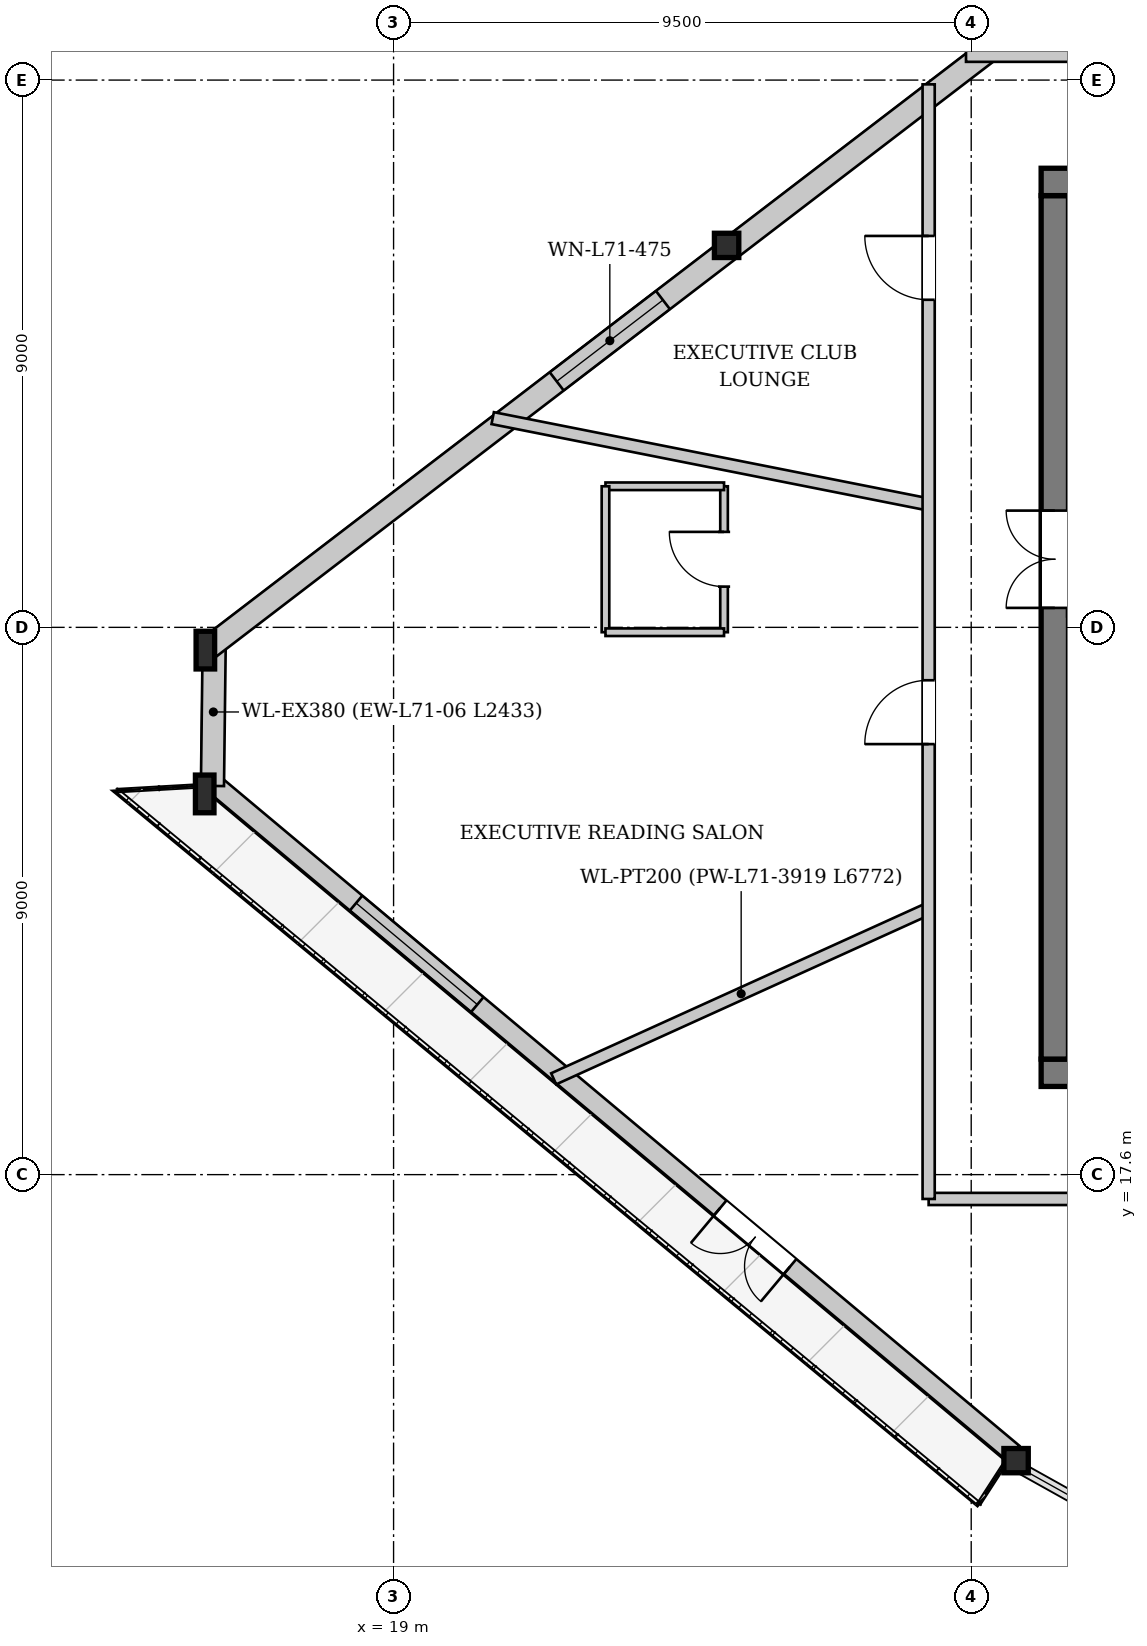
"""IFC4 building model, lengths in metres.
Left out: names, types, materials, properties, quantities, classifications, styles, units other than length and angle.
Written with IfcOpenShell. Run it as: python <this file> out.ifc"""

import sys

from ifc_helpers import new_model, si_unit, direction, frame, frame_2d, origin, origin_2d, place, context, subcontext, project, spatial, rectangle, i_section, extrude, source, transform, mapped, element, fill, save


model = new_model("IFC4")
c1 = context("Model", 3, precision=1e-05, world=origin(), true_north=direction((0.0, 1.0)))
c2 = subcontext(c1, "Body", "Model", "MODEL_VIEW")
j1 = project(units=[si_unit("LENGTHUNIT", "METRE"), si_unit("PLANEANGLEUNIT", "RADIAN")], contexts=[c1])
p1 = place(None, origin())
s1 = spatial("IfcSite", under=j1, at=p1, CompositionType="ELEMENT")
p2 = place(p1, origin())
s2 = spatial("IfcBuilding", under=s1, at=p2, CompositionType="ELEMENT")
p3 = place(p2, frame((0.0, 0.0, 266.9)))
s3 = spatial("IfcBuildingStorey", under=s2, at=p3, CompositionType="ELEMENT", Elevation=266.9)
m1 = source(origin(), c2, "Body", "SweptSolid", [
    extrude(i_section(OverallWidth=0.401, OverallDepth=0.399, WebThickness=0.022, FlangeThickness=0.034, at=origin_2d()), origin(), (0.0, 0.0, 1.0), 3.449),
])
p4 = place(p3, frame((24.491, 33.034, 0.0), z_axis=(-0.008211715647, -0.088700687123, 0.996024475518), x_axis=(0.995742024997, -0.092183619234, 0.0)))
e1 = element("IfcColumn", 1, at=p4, inside=s3, PredefinedType="COLUMN", context=c2, shape_type="MappedRepresentation", body=[
    mapped(m1, transform((0.0, 0.0, 0.0), x_axis=(1.0, 0.0, 0.0), y_axis=(0.0, 1.0, 0.0), z_axis=(0.0, 0.0, 1.0), scale=1.0)),
])
m2 = source(origin(), c2, "Body", "SweptSolid", [
    extrude(i_section(OverallWidth=0.305, OverallDepth=0.62, WebThickness=0.021, FlangeThickness=0.04, at=origin_2d()), origin(), (0.0, 0.0, 1.0), 3.46),
])
p5 = place(p3, frame((15.861, 26.427, 0.0), z_axis=(0.025262966256, -0.116435459002, 0.992876914035), x_axis=(0.977261812504, 0.212036199319, 0.0)))
e2 = element("IfcColumn", 2, at=p5, inside=s3, PredefinedType="COLUMN", context=c2, shape_type="MappedRepresentation", body=[
    mapped(m2, transform((0.0, 0.0, 0.0), x_axis=(1.0, 0.0, 0.0), y_axis=(0.0, 1.0, 0.0), z_axis=(0.0, 0.0, 1.0), scale=1.0)),
])
m3 = source(origin(), c2, "Body", "SweptSolid", [
    extrude(i_section(OverallWidth=0.305, OverallDepth=0.62, WebThickness=0.021, FlangeThickness=0.04, at=origin_2d()), origin(), (0.0, 0.0, 1.0), 3.448),
])
p6 = place(p3, frame((15.831, 23.994, 0.0), z_axis=(0.036256323358, -0.077398752793, 0.996340761026), x_axis=(0.90556835757, 0.42420036512, 0.0)))
e3 = element("IfcColumn", 3, at=p6, inside=s3, PredefinedType="COLUMN", context=c2, shape_type="MappedRepresentation", body=[
    mapped(m3, transform((0.0, 0.0, 0.0), x_axis=(1.0, 0.0, 0.0), y_axis=(0.0, 1.0, 0.0), z_axis=(0.0, 0.0, 1.0), scale=1.0)),
])
m4 = source(origin(), c2, "Body", "SweptSolid", [
    extrude(i_section(OverallWidth=0.401, OverallDepth=0.399, WebThickness=0.022, FlangeThickness=0.034, at=origin_2d()), origin(), (0.0, 0.0, 1.0), 3.448),
])
p7 = place(p3, frame((29.086, 12.897, 0.0), z_axis=(0.088141745555, -0.000212389748, 0.996107919646), x_axis=(0.002409631559, 0.999997096834, 0.0)))
e4 = element("IfcColumn", 4, at=p7, inside=s3, PredefinedType="COLUMN", context=c2, shape_type="MappedRepresentation", body=[
    mapped(m4, transform((0.0, 0.0, 0.0), x_axis=(1.0, 0.0, 0.0), y_axis=(0.0, 1.0, 0.0), z_axis=(0.0, 0.0, 1.0), scale=1.0)),
])
p8 = place(p3, frame((29.189, 13.02, 0.0), z_axis=(0.0, 0.0, 1.0), x_axis=(-0.76674910501, 0.641946890301, 0.0)))
e5 = element("IfcWall", 5, at=p8, inside=s3, PredefinedType="SOLIDWALL", context=c2, shape_type="SweptSolid", body=[
    extrude(rectangle(XDim=17.287, YDim=0.32, at=frame_2d((8.644, 0.0))), origin(), (0.0, 0.0, 1.0), 2.872),
])
p9 = place(p8, frame((4.782, 0.0, 0.0)))
e6 = element("IfcOpeningElement", 6, at=p9, cuts=e5, PredefinedType="OPENING", context=c2, shape_type="SweptSolid", body=[
    extrude(rectangle(XDim=1.5, YDim=2.3, at=frame_2d((0.75, 1.15))), frame((0.0, 0.17, 0.0), z_axis=(0.0, -1.0, 0.0), x_axis=(1.0, 0.0, 0.0)), (0.0, 0.0, 1.0), 0.34),
])
p10 = place(p8, frame((11.492, 0.0, 0.402)))
e7 = element("IfcOpeningElement", 7, at=p10, cuts=e5, PredefinedType="OPENING", context=c2, shape_type="SweptSolid", body=[
    extrude(rectangle(XDim=2.6, YDim=2.35, at=frame_2d((1.3, 1.175))), frame((0.0, 0.17, 0.0), z_axis=(0.0, -1.0, 0.0), x_axis=(1.0, 0.0, 0.0)), (0.0, 0.0, 1.0), 0.34),
])
p11 = place(p3, frame((16.021, 23.992, 0.0), z_axis=(0.0, 0.0, 1.0), x_axis=(0.012141603698, 0.999926288013, 0.0)))
e8 = element("IfcWall", 8, at=p11, inside=s3, PredefinedType="SOLIDWALL", context=c2, shape_type="SweptSolid", body=[
    extrude(rectangle(XDim=2.433, YDim=0.38, at=frame_2d((1.217, 0.0))), origin(), (0.0, 0.0, 1.0), 2.872),
])
p12 = place(p3, frame((15.976, 26.276, 0.0), z_axis=(0.0, 0.0, 1.0), x_axis=(0.794029694054, 0.607878972297, 0.0)))
e9 = element("IfcWall", 9, at=p12, inside=s3, PredefinedType="SOLIDWALL", context=c2, shape_type="SweptSolid", body=[
    extrude(rectangle(XDim=21.739, YDim=0.38, at=frame_2d((10.869, 0.0))), origin(), (0.0, 0.0, 1.0), 2.872),
])
p13 = place(p12, frame((7.187, 0.0, 0.502)))
e10 = element("IfcOpeningElement", 10, at=p13, cuts=e9, PredefinedType="OPENING", context=c2, shape_type="SweptSolid", body=[
    extrude(rectangle(XDim=2.2, YDim=2.25, at=frame_2d((1.1, 1.125))), frame((0.0, 0.2, 0.0), z_axis=(0.0, -1.0, 0.0), x_axis=(1.0, 0.0, 0.0)), (0.0, 0.0, 1.0), 0.4),
])
p14 = place(p12, frame((16.752, 0.0, 0.502)))
e11 = element("IfcOpeningElement", 11, at=p14, cuts=e9, PredefinedType="OPENING", context=c2, shape_type="SweptSolid", body=[
    extrude(rectangle(XDim=2.2, YDim=2.25, at=frame_2d((1.1, 1.125))), frame((0.0, 0.2, 0.0), z_axis=(0.0, -1.0, 0.0), x_axis=(1.0, 0.0, 0.0)), (0.0, 0.0, 1.0), 0.4),
])
p15 = place(p3, frame((46.35, 19.275, 0.0), z_axis=(0.0, 0.0, 1.0), x_axis=(-1.0, 0.0, 0.0)))
e12 = element("IfcWall", 12, at=p15, inside=s3, PredefinedType="SHEAR", context=c2, shape_type="SweptSolid", body=[
    extrude(rectangle(XDim=16.7, YDim=0.45, at=frame_2d((8.35, 0.0))), origin(), (0.0, 0.0, 1.0), 3.38),
])
p16 = place(p15, frame((4.55, 0.0, 0.0)))
e13 = element("IfcOpeningElement", 13, at=p16, cuts=e12, PredefinedType="OPENING", context=c2, shape_type="SweptSolid", body=[
    extrude(rectangle(XDim=1.12, YDim=2.25, at=frame_2d((0.56, 1.125))), frame((0.0, 0.235, 0.0), z_axis=(0.0, -1.0, 0.0), x_axis=(1.0, 0.0, 0.0)), (0.0, 0.0, 1.0), 0.47),
])
p17 = place(p15, frame((11.05, 0.0, 0.0)))
e14 = element("IfcOpeningElement", 14, at=p17, cuts=e12, PredefinedType="OPENING", context=c2, shape_type="SweptSolid", body=[
    extrude(rectangle(XDim=1.12, YDim=2.25, at=frame_2d((0.56, 1.125))), frame((0.0, 0.235, 0.0), z_axis=(0.0, -1.0, 0.0), x_axis=(1.0, 0.0, 0.0)), (0.0, 0.0, 1.0), 0.47),
])
p18 = place(p3, frame((29.875, 19.5, 0.0), z_axis=(0.0, 0.0, 1.0), x_axis=(0.0, 1.0, 0.0)))
e15 = element("IfcWall", 15, at=p18, inside=s3, PredefinedType="SHEAR", context=c2, shape_type="SweptSolid", body=[
    extrude(rectangle(XDim=14.2, YDim=0.45, at=frame_2d((7.1, 0.0))), origin(), (0.0, 0.0, 1.0), 3.38),
])
p19 = place(p18, frame((7.42, 0.0, 0.0)))
e16 = element("IfcOpeningElement", 16, at=p19, cuts=e15, PredefinedType="OPENING", context=c2, shape_type="SweptSolid", body=[
    extrude(rectangle(XDim=1.6, YDim=2.2, at=frame_2d((0.8, 1.1))), frame((0.0, 0.235, 0.0), z_axis=(0.0, -1.0, 0.0), x_axis=(1.0, 0.0, 0.0)), (0.0, 0.0, 1.0), 0.47),
])
p20 = place(p3, frame((29.65, 33.925, 0.0), z_axis=(0.0, 0.0, 1.0), x_axis=(1.0, 0.0, 0.0)))
e17 = element("IfcWall", 17, at=p20, inside=s3, PredefinedType="SHEAR", context=c2, shape_type="SweptSolid", body=[
    extrude(rectangle(XDim=16.7, YDim=0.45, at=frame_2d((8.35, 0.0))), origin(), (0.0, 0.0, 1.0), 3.38),
])
p21 = place(p20, frame((1.45, 0.0, 0.0)))
e18 = element("IfcOpeningElement", 18, at=p21, cuts=e17, PredefinedType="OPENING", context=c2, shape_type="SweptSolid", body=[
    extrude(rectangle(XDim=0.95, YDim=2.1, at=frame_2d((0.475, 1.05))), frame((0.0, 0.235, 0.0), z_axis=(0.0, -1.0, 0.0), x_axis=(1.0, 0.0, 0.0)), (0.0, 0.0, 1.0), 0.47),
])
p22 = place(p20, frame((3.83, 0.0, 0.0)))
e19 = element("IfcOpeningElement", 19, at=p22, cuts=e17, PredefinedType="OPENING", context=c2, shape_type="SweptSolid", body=[
    extrude(rectangle(XDim=1.32, YDim=2.2, at=frame_2d((0.66, 1.1))), frame((0.0, 0.235, 0.0), z_axis=(0.0, -1.0, 0.0), x_axis=(1.0, 0.0, 0.0)), (0.0, 0.0, 1.0), 0.47),
])
p23 = place(p3, frame((27.8, 21.973, 0.0), z_axis=(0.0, 0.0, 1.0), x_axis=(-0.910683532828, -0.41310471195, 0.0)))
e20 = element("IfcWall", 20, at=p23, inside=s3, PredefinedType="PARTITIONING", context=c2, shape_type="SweptSolid", body=[
    extrude(rectangle(XDim=6.771, YDim=0.2, at=frame_2d((3.386, 0.0))), origin(), (0.0, 0.0, 1.0), 3.38),
])
p24 = place(p3, frame((27.8, 28.621, 0.0), z_axis=(0.0, 0.0, 1.0), x_axis=(-0.980942555911, 0.194297972206, 0.0)))
e21 = element("IfcWall", 21, at=p24, inside=s3, PredefinedType="PARTITIONING", context=c2, shape_type="SweptSolid", body=[
    extrude(rectangle(XDim=7.309, YDim=0.2, at=frame_2d((3.655, 0.0))), origin(), (0.0, 0.0, 1.0), 3.38),
])
p25 = place(p3, frame((24.435, 26.52, 0.0), z_axis=(0.0, 0.0, 1.0), x_axis=(0.0, 1.0, 0.0)))
e22 = element("IfcWall", 22, at=p25, inside=s3, PredefinedType="PARTITIONING", context=c2, shape_type="SweptSolid", body=[
    extrude(rectangle(XDim=2.4, YDim=0.125, at=frame_2d((1.2, 0.0))), origin(), (0.0, 0.0, 1.0), 3.38),
])
p26 = place(p25, frame((0.75, 0.0, 0.0)))
e23 = element("IfcOpeningElement", 23, at=p26, cuts=e22, PredefinedType="OPENING", context=c2, shape_type="SweptSolid", body=[
    extrude(rectangle(XDim=0.9, YDim=2.1, at=frame_2d((0.45, 1.05))), frame((0.0, 0.073, 0.0), z_axis=(0.0, -1.0, 0.0), x_axis=(1.0, 0.0, 0.0)), (0.0, 0.0, 1.0), 0.145),
])
p27 = place(p3, frame((24.435, 28.92, 0.0), z_axis=(0.0, 0.0, 1.0), x_axis=(-1.0, 0.0, 0.0)))
e24 = element("IfcWall", 24, at=p27, inside=s3, PredefinedType="PARTITIONING", context=c2, shape_type="SweptSolid", body=[
    extrude(rectangle(XDim=1.95, YDim=0.125, at=frame_2d((0.975, 0.0))), origin(), (0.0, 0.0, 1.0), 3.38),
])
p28 = place(p3, frame((22.485, 28.92, 0.0), z_axis=(0.0, 0.0, 1.0), x_axis=(0.0, -1.0, 0.0)))
e25 = element("IfcWall", 25, at=p28, inside=s3, PredefinedType="PARTITIONING", context=c2, shape_type="SweptSolid", body=[
    extrude(rectangle(XDim=2.4, YDim=0.125, at=frame_2d((1.2, 0.0))), origin(), (0.0, 0.0, 1.0), 3.38),
])
p29 = place(p3, frame((22.485, 26.52, 0.0), z_axis=(0.0, 0.0, 1.0), x_axis=(1.0, 0.0, 0.0)))
e26 = element("IfcWall", 26, at=p29, inside=s3, PredefinedType="PARTITIONING", context=c2, shape_type="SweptSolid", body=[
    extrude(rectangle(XDim=1.95, YDim=0.125, at=frame_2d((0.975, 0.0))), origin(), (0.0, 0.0, 1.0), 3.055),
])
p30 = place(p3, frame((27.8, 17.2, 0.0), z_axis=(0.0, 0.0, 1.0), x_axis=(1.0, 0.0, 0.0)))
e27 = element("IfcWall", 27, at=p30, inside=s3, PredefinedType="PARTITIONING", context=c2, shape_type="SweptSolid", body=[
    extrude(rectangle(XDim=20.4, YDim=0.2, at=frame_2d((10.2, 0.0))), origin(), (0.0, 0.0, 1.0), 3.38),
])
p31 = place(p30, frame((5.109, 0.0, 0.0)))
e28 = element("IfcOpeningElement", 28, at=p31, cuts=e27, PredefinedType="OPENING", context=c2, shape_type="SweptSolid", body=[
    extrude(rectangle(XDim=1.05, YDim=2.2, at=frame_2d((0.525, 1.1))), frame((0.0, 0.11, 0.0), z_axis=(0.0, -1.0, 0.0), x_axis=(1.0, 0.0, 0.0)), (0.0, 0.0, 1.0), 0.22),
])
p32 = place(p3, frame((27.8, 17.2, 0.0), z_axis=(0.0, 0.0, 1.0), x_axis=(0.0, 1.0, 0.0)))
e29 = element("IfcWall", 29, at=p32, inside=s3, PredefinedType="PARTITIONING", context=c2, shape_type="SweptSolid", body=[
    extrude(rectangle(XDim=18.33, YDim=0.2, at=frame_2d((9.165, 0.0))), origin(), (0.0, 0.0, 1.0), 3.38),
])
p33 = place(p32, frame((14.787, 0.0, 0.0)))
e30 = element("IfcOpeningElement", 30, at=p33, cuts=e29, PredefinedType="OPENING", context=c2, shape_type="SweptSolid", body=[
    extrude(rectangle(XDim=1.05, YDim=2.2, at=frame_2d((0.525, 1.1))), frame((0.0, 0.11, 0.0), z_axis=(0.0, -1.0, 0.0), x_axis=(1.0, 0.0, 0.0)), (0.0, 0.0, 1.0), 0.22),
])
p34 = place(p32, frame((7.48, 0.0, 0.0)))
e31 = element("IfcOpeningElement", 31, at=p34, cuts=e29, PredefinedType="OPENING", context=c2, shape_type="SweptSolid", body=[
    extrude(rectangle(XDim=1.05, YDim=2.2, at=frame_2d((0.525, 1.1))), frame((0.0, 0.11, 0.0), z_axis=(0.0, -1.0, 0.0), x_axis=(1.0, 0.0, 0.0)), (0.0, 0.0, 1.0), 0.22),
])
p35 = place(p3, frame((28.414, 36.0, 0.0), z_axis=(0.0, 0.0, 1.0), x_axis=(1.0, 0.0, 0.0)))
e32 = element("IfcWall", 32, at=p35, inside=s3, PredefinedType="PARTITIONING", context=c2, shape_type="SweptSolid", body=[
    extrude(rectangle(XDim=12.586, YDim=0.2, at=frame_2d((6.293, 0.0))), origin(), (0.0, 0.0, 1.0), 3.38),
])
p36 = place(p35, frame((11.236, 0.0, 0.0)))
e33 = element("IfcOpeningElement", 33, at=p36, cuts=e32, PredefinedType="OPENING", context=c2, shape_type="SweptSolid", body=[
    extrude(rectangle(XDim=1.05, YDim=2.2, at=frame_2d((0.525, 1.1))), frame((0.0, 0.11, 0.0), z_axis=(0.0, -1.0, 0.0), x_axis=(1.0, 0.0, 0.0)), (0.0, 0.0, 1.0), 0.22),
])
m5 = source(origin(), c2, "Body", "SweptSolid", [
    extrude(rectangle(XDim=1.5, YDim=2.3, at=frame_2d((0.75, 1.15))), frame((0.0, 0.025, 0.0), z_axis=(0.0, -1.0, 0.0), x_axis=(1.0, 0.0, 0.0)), (0.0, 0.0, 1.0), 0.05),
])
p37 = place(p9, origin())
e34 = element("IfcDoor", 34, at=p37, inside=s3, OperationType="DOUBLE_DOOR_SINGLE_SWING", PredefinedType="DOOR", context=c2, shape_type="MappedRepresentation", body=[
    mapped(m5, transform((0.0, 0.0, 0.0), x_axis=(1.0, 0.0, 0.0), y_axis=(0.0, 1.0, 0.0), z_axis=(0.0, 0.0, 1.0), scale=1.0)),
])
fill(e6, e34)
m6 = source(origin(), c2, "Body", "SweptSolid", [
    extrude(rectangle(XDim=2.6, YDim=2.35, at=frame_2d((1.3, 1.175))), frame((0.0, 0.03, 0.0), z_axis=(0.0, -1.0, 0.0), x_axis=(1.0, 0.0, 0.0)), (0.0, 0.0, 1.0), 0.06),
])
p38 = place(p10, origin())
e35 = element("IfcWindow", 35, at=p38, inside=s3, PartitioningType="SINGLE_PANEL", PredefinedType="WINDOW", context=c2, shape_type="MappedRepresentation", body=[
    mapped(m6, transform((0.0, 0.0, 0.0), x_axis=(1.0, 0.0, 0.0), y_axis=(0.0, 1.0, 0.0), z_axis=(0.0, 0.0, 1.0), scale=1.0)),
])
fill(e7, e35)
m7 = source(origin(), c2, "Body", "SweptSolid", [
    extrude(rectangle(XDim=2.2, YDim=2.25, at=frame_2d((1.1, 1.125))), frame((0.0, 0.03, 0.0), z_axis=(0.0, -1.0, 0.0), x_axis=(1.0, 0.0, 0.0)), (0.0, 0.0, 1.0), 0.06),
])
p39 = place(p13, origin())
e36 = element("IfcWindow", 36, at=p39, inside=s3, PartitioningType="SINGLE_PANEL", PredefinedType="WINDOW", context=c2, shape_type="MappedRepresentation", body=[
    mapped(m7, transform((0.0, 0.0, 0.0), x_axis=(1.0, 0.0, 0.0), y_axis=(0.0, 1.0, 0.0), z_axis=(0.0, 0.0, 1.0), scale=1.0)),
])
fill(e10, e36)
m8 = source(origin(), c2, "Body", "SweptSolid", [
    extrude(rectangle(XDim=1.6, YDim=2.2, at=frame_2d((0.8, 1.1))), frame((0.0, 0.025, 0.0), z_axis=(0.0, -1.0, 0.0), x_axis=(1.0, 0.0, 0.0)), (0.0, 0.0, 1.0), 0.05),
])
p40 = place(p19, origin())
e37 = element("IfcDoor", 37, at=p40, inside=s3, OperationType="DOUBLE_DOOR_SINGLE_SWING", PredefinedType="DOOR", context=c2, shape_type="MappedRepresentation", body=[
    mapped(m8, transform((0.0, 0.0, 0.0), x_axis=(1.0, 0.0, 0.0), y_axis=(0.0, 1.0, 0.0), z_axis=(0.0, 0.0, 1.0), scale=1.0)),
])
fill(e16, e37)
m9 = source(origin(), c2, "Body", "SweptSolid", [
    extrude(rectangle(XDim=0.9, YDim=2.1, at=frame_2d((0.45, 1.05))), frame((0.0, 0.025, 0.0), z_axis=(0.0, -1.0, 0.0), x_axis=(1.0, 0.0, 0.0)), (0.0, 0.0, 1.0), 0.05),
])
p41 = place(p26, origin())
e38 = element("IfcDoor", 38, at=p41, inside=s3, OperationType="SINGLE_SWING_RIGHT", PredefinedType="DOOR", context=c2, shape_type="MappedRepresentation", body=[
    mapped(m9, transform((0.0, 0.0, 0.0), x_axis=(1.0, 0.0, 0.0), y_axis=(0.0, 1.0, 0.0), z_axis=(0.0, 0.0, 1.0), scale=1.0)),
])
fill(e23, e38)
m10 = source(origin(), c2, "Body", "SweptSolid", [
    extrude(rectangle(XDim=1.05, YDim=2.2, at=frame_2d((0.525, 1.1))), frame((0.0, 0.025, 0.0), z_axis=(0.0, -1.0, 0.0), x_axis=(1.0, 0.0, 0.0)), (0.0, 0.0, 1.0), 0.05),
])
p42 = place(p33, origin())
e39 = element("IfcDoor", 39, at=p42, inside=s3, OperationType="SINGLE_SWING_RIGHT", PredefinedType="DOOR", context=c2, shape_type="MappedRepresentation", body=[
    mapped(m10, transform((0.0, 0.0, 0.0), x_axis=(1.0, 0.0, 0.0), y_axis=(0.0, 1.0, 0.0), z_axis=(0.0, 0.0, 1.0), scale=1.0)),
])
fill(e30, e39)
p43 = place(p34, origin())
e40 = element("IfcDoor", 40, at=p43, inside=s3, OperationType="SINGLE_SWING_LEFT", PredefinedType="DOOR", context=c2, shape_type="MappedRepresentation", body=[
    mapped(m10, transform((0.0, 0.0, 0.0), x_axis=(1.0, 0.0, 0.0), y_axis=(0.0, 1.0, 0.0), z_axis=(0.0, 0.0, 1.0), scale=1.0)),
])
fill(e31, e40)
save(model, sys.argv[1])
